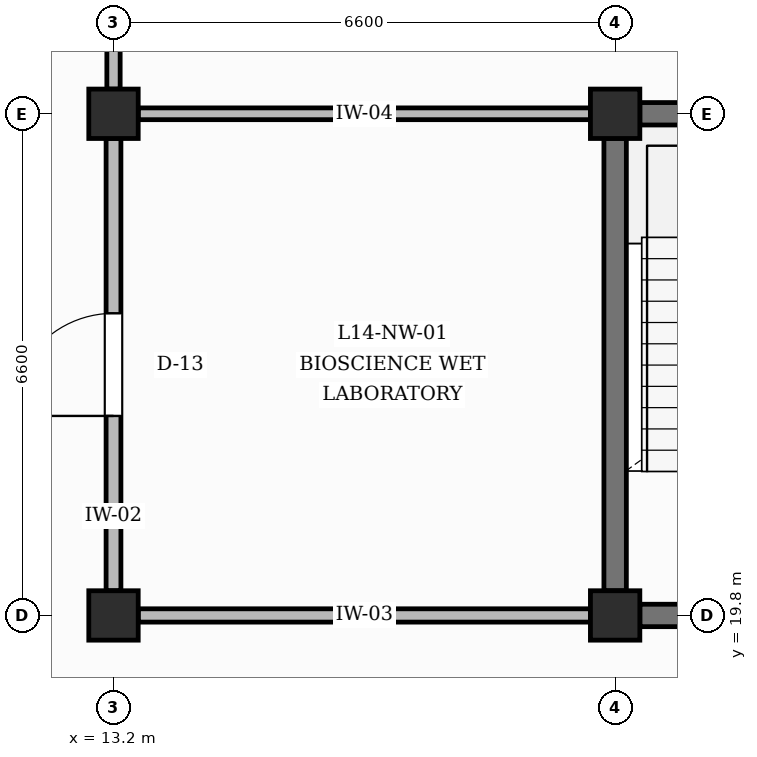
"""IFC4 building model, lengths in metres.
Left out: names, types, materials, properties, quantities, classifications, styles, units other than length and angle.
Written with IfcOpenShell. Run it as: python <this file> out.ifc"""

import sys

from ifc_helpers import new_model, si_unit, direction, frame, frame_2d, origin, origin_2d, place, context, subcontext, project, spatial, rectangle, extrude, element, fill, save


model = new_model("IFC4")
c1 = context("Model", 3, precision=1e-05, world=origin(), true_north=direction((0.0, 1.0)))
c2 = subcontext(c1, "Body", "Model", "MODEL_VIEW")
j1 = project(units=[si_unit("LENGTHUNIT", "METRE"), si_unit("PLANEANGLEUNIT", "RADIAN")], contexts=[c1])
p1 = place(None, origin())
s1 = spatial("IfcSite", under=j1, at=p1, CompositionType="ELEMENT")
p2 = place(p1, origin())
s2 = spatial("IfcBuilding", under=s1, at=p2, CompositionType="ELEMENT")
p3 = place(p2, frame((0.0, 0.0, 60.6)))
s3 = spatial("IfcBuildingStorey", under=s2, at=p3, CompositionType="ELEMENT", Elevation=60.6)
for number, where, z_axis, x_axis in (
    (1, (13.2, 19.8, 0.0), (0.0, 0.0, 1.0), (1.0, 0.0, 0.0)),
    (2, (13.2, 26.4, 0.0), (0.0, 0.0, 1.0), (1.0, 0.0, 0.0)),
    (3, (19.8, 19.8, 0.0), (0.0, 0.0, 1.0), (1.0, 0.0, 0.0)),
    (4, (19.8, 26.4, 0.0), (0.0, 0.0, 1.0), (1.0, 0.0, 0.0)),
):
    element("IfcColumn", number, at=place(p3, frame(where, z_axis=z_axis, x_axis=x_axis)), inside=s3, PredefinedType="COLUMN", context=c2, shape_type="SweptSolid", body=[
        extrude(rectangle(XDim=0.65, YDim=0.65, at=origin_2d()), origin(), (0.0, 0.0, 1.0), 4.2),
    ])
p4 = place(p3, frame((20.125, 19.8, 0.0), z_axis=(0.0, 0.0, 1.0), x_axis=(1.0, 0.0, 0.0)))
e5 = element("IfcWall", 5, at=p4, inside=s3, PredefinedType="SHEAR", context=c2, shape_type="SweptSolid", body=[
    extrude(rectangle(XDim=5.95, YDim=0.295, at=frame_2d((2.975, 0.0))), origin(), (0.0, 0.0, 1.0), 3.31),
])
p5 = place(p4, frame((2.4, 0.0, 0.0)))
e6 = element("IfcOpeningElement", 6, at=p5, cuts=e5, PredefinedType="OPENING", context=c2, shape_type="SweptSolid", body=[
    extrude(rectangle(XDim=1.15, YDim=2.2, at=frame_2d((0.575, 1.1))), frame((0.0, 0.157, 0.0), z_axis=(0.0, -1.0, 0.0), x_axis=(1.0, 0.0, 0.0)), (0.0, 0.0, 1.0), 0.315),
])
for number, where, z_axis, x_axis in (
    (7, (20.125, 26.4, 0.0), (0.0, 0.0, 1.0), (1.0, 0.0, 0.0)),
    (8, (19.8, 20.125, 0.0), (0.0, 0.0, 1.0), (0.0, 1.0, 0.0)),
):
    element("IfcWall", number, at=place(p3, frame(where, z_axis=z_axis, x_axis=x_axis)), inside=s3, PredefinedType="SHEAR", context=c2, shape_type="SweptSolid", body=[
        extrude(rectangle(XDim=5.95, YDim=0.295, at=frame_2d((2.975, 0.0))), origin(), (0.0, 0.0, 1.0), 3.31),
    ])
p6 = place(p3, frame((13.2, 20.125, 0.0), z_axis=(0.0, 0.0, 1.0), x_axis=(0.0, 1.0, 0.0)))
e9 = element("IfcWall", 9, at=p6, inside=s3, PredefinedType="PARTITIONING", context=c2, shape_type="SweptSolid", body=[
    extrude(rectangle(XDim=5.95, YDim=0.195, at=frame_2d((2.975, 0.0))), origin(), (0.0, 0.0, 1.0), 3.31),
])
p7 = place(p6, frame((2.3, 0.0, 0.0)))
e10 = element("IfcOpeningElement", 10, at=p7, cuts=e9, PredefinedType="OPENING", context=c2, shape_type="SweptSolid", body=[
    extrude(rectangle(XDim=1.35, YDim=2.3, at=frame_2d((0.675, 1.15))), frame((0.0, 0.107, 0.0), z_axis=(0.0, -1.0, 0.0), x_axis=(1.0, 0.0, 0.0)), (0.0, 0.0, 1.0), 0.215),
])
p8 = place(p3, frame((13.2, 26.725, 0.0), z_axis=(0.0, 0.0, 1.0), x_axis=(0.0, 1.0, 0.0)))
e11 = element("IfcWall", 11, at=p8, inside=s3, PredefinedType="PARTITIONING", context=c2, shape_type="SweptSolid", body=[
    extrude(rectangle(XDim=5.95, YDim=0.175, at=frame_2d((2.975, 0.0))), origin(), (0.0, 0.0, 1.0), 3.31),
])
p9 = place(p8, frame((2.325, 0.0, 0.0)))
e12 = element("IfcOpeningElement", 12, at=p9, cuts=e11, PredefinedType="OPENING", context=c2, shape_type="SweptSolid", body=[
    extrude(rectangle(XDim=1.3, YDim=2.3, at=frame_2d((0.65, 1.15))), frame((0.0, 0.097, 0.0), z_axis=(0.0, -1.0, 0.0), x_axis=(1.0, 0.0, 0.0)), (0.0, 0.0, 1.0), 0.195),
])
p10 = place(p3, frame((13.525, 19.8, 0.0), z_axis=(0.0, 0.0, 1.0), x_axis=(1.0, 0.0, 0.0)))
e13 = element("IfcWall", 13, at=p10, inside=s3, PredefinedType="PARTITIONING", context=c2, shape_type="SweptSolid", body=[
    extrude(rectangle(XDim=5.95, YDim=0.175, at=frame_2d((2.975, 0.0))), origin(), (0.0, 0.0, 1.0), 3.31),
])
p11 = place(p3, frame((13.525, 26.4, 0.0), z_axis=(0.0, 0.0, 1.0), x_axis=(1.0, 0.0, 0.0)))
e14 = element("IfcWall", 14, at=p11, inside=s3, PredefinedType="PARTITIONING", context=c2, shape_type="SweptSolid", body=[
    extrude(rectangle(XDim=5.95, YDim=0.155, at=frame_2d((2.975, 0.0))), origin(), (0.0, 0.0, 1.0), 3.31),
])
p12 = place(p7, origin())
e15 = element("IfcDoor", 15, at=p12, inside=s3, OperationType="SINGLE_SWING_LEFT", PredefinedType="DOOR", context=c2, shape_type="SweptSolid", body=[
    extrude(rectangle(XDim=1.35, YDim=2.3, at=frame_2d((0.675, 1.15))), frame((0.0, 0.025, 0.0), z_axis=(0.0, -1.0, 0.0), x_axis=(1.0, 0.0, 0.0)), (0.0, 0.0, 1.0), 0.05),
])
fill(e10, e15)
save(model, sys.argv[1])
